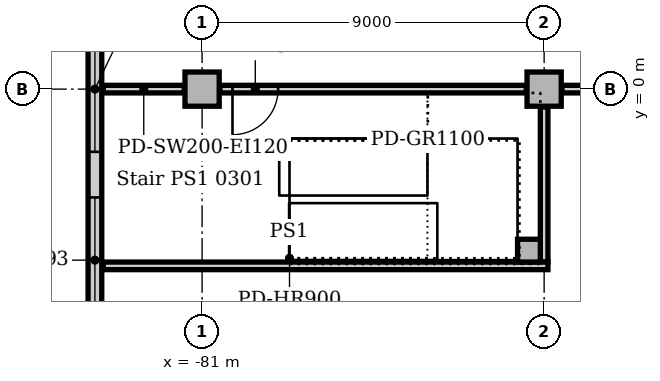
"""IFC4 building model, lengths in metres.
Left out: names, types, materials, properties, quantities, classifications, styles, units other than length and angle.
Written with IfcOpenShell. Run it as: python <this file> out.ifc"""

import sys

from ifc_helpers import new_model, si_unit, direction, frame, frame_2d, origin, origin_2d, place, context, subcontext, project, spatial, rectangle, extrude, element, fill, save


model = new_model("IFC4")
c1 = context("Model", 3, precision=1e-05, world=origin(), true_north=direction((0.0, 1.0)))
c2 = subcontext(c1, "Body", "Model", "MODEL_VIEW")
j1 = project(units=[si_unit("LENGTHUNIT", "METRE"), si_unit("PLANEANGLEUNIT", "RADIAN")], contexts=[c1])
p1 = place(None, origin())
s1 = spatial("IfcSite", under=j1, at=p1, CompositionType="ELEMENT")
p2 = place(p1, origin())
s2 = spatial("IfcBuilding", under=s1, at=p2, CompositionType="ELEMENT")
p3 = place(p2, frame((0.0, 0.0, 16.0)))
s3 = spatial("IfcBuildingStorey", under=s2, at=p3, CompositionType="ELEMENT", Elevation=16.0)
for number, where, z_axis, x_axis in (
    (1, (-81.0, 0.0, 0.0), (0.0, 0.0, 1.0), (1.0, 0.0, 0.0)),
    (2, (-72.0, 0.0, 0.0), (0.0, 0.0, 1.0), (1.0, 0.0, 0.0)),
):
    element("IfcColumn", number, at=place(p3, frame(where, z_axis=z_axis, x_axis=x_axis)), inside=s3, PredefinedType="COLUMN", context=c2, shape_type="SweptSolid", body=[
        extrude(rectangle(XDim=0.9, YDim=0.9, at=origin_2d()), origin(), (0.0, 0.0, 1.0), 4.7),
    ])
p4 = place(p3, frame((-83.82, 54.0, 0.0), z_axis=(0.0, 0.0, 1.0), x_axis=(0.0, -1.0, 0.0)))
e3 = element("IfcWall", 3, at=p4, inside=s3, PredefinedType="STANDARD", context=c2, shape_type="SweptSolid", body=[
    extrude(rectangle(XDim=63.0, YDim=0.36, at=frame_2d((31.5, 0.0))), origin(), (0.0, 0.0, 1.0), 4.7),
])
p5 = place(p4, frame((2.85, 0.0, 0.9)))
e4 = element("IfcOpeningElement", 4, at=p5, cuts=e3, PredefinedType="OPENING", context=c2, shape_type="SweptSolid", body=[
    extrude(rectangle(XDim=3.3, YDim=2.4, at=frame_2d((1.65, 1.2))), frame((0.0, 0.19, 0.0), z_axis=(0.0, -1.0, 0.0), x_axis=(1.0, 0.0, 0.0)), (0.0, 0.0, 1.0), 0.38),
])
p6 = place(p4, frame((7.35, 0.0, 0.9)))
e5 = element("IfcOpeningElement", 5, at=p6, cuts=e3, PredefinedType="OPENING", context=c2, shape_type="SweptSolid", body=[
    extrude(rectangle(XDim=3.3, YDim=2.4, at=frame_2d((1.65, 1.2))), frame((0.0, 0.19, 0.0), z_axis=(0.0, -1.0, 0.0), x_axis=(1.0, 0.0, 0.0)), (0.0, 0.0, 1.0), 0.38),
])
p7 = place(p4, frame((11.85, 0.0, 0.9)))
e6 = element("IfcOpeningElement", 6, at=p7, cuts=e3, PredefinedType="OPENING", context=c2, shape_type="SweptSolid", body=[
    extrude(rectangle(XDim=3.3, YDim=2.4, at=frame_2d((1.65, 1.2))), frame((0.0, 0.19, 0.0), z_axis=(0.0, -1.0, 0.0), x_axis=(1.0, 0.0, 0.0)), (0.0, 0.0, 1.0), 0.38),
])
p8 = place(p4, frame((16.35, 0.0, 0.9)))
e7 = element("IfcOpeningElement", 7, at=p8, cuts=e3, PredefinedType="OPENING", context=c2, shape_type="SweptSolid", body=[
    extrude(rectangle(XDim=3.3, YDim=2.4, at=frame_2d((1.65, 1.2))), frame((0.0, 0.19, 0.0), z_axis=(0.0, -1.0, 0.0), x_axis=(1.0, 0.0, 0.0)), (0.0, 0.0, 1.0), 0.38),
])
p9 = place(p4, frame((20.85, 0.0, 0.9)))
e8 = element("IfcOpeningElement", 8, at=p9, cuts=e3, PredefinedType="OPENING", context=c2, shape_type="SweptSolid", body=[
    extrude(rectangle(XDim=3.3, YDim=2.4, at=frame_2d((1.65, 1.2))), frame((0.0, 0.19, 0.0), z_axis=(0.0, -1.0, 0.0), x_axis=(1.0, 0.0, 0.0)), (0.0, 0.0, 1.0), 0.38),
])
p10 = place(p4, frame((25.35, 0.0, 0.9)))
e9 = element("IfcOpeningElement", 9, at=p10, cuts=e3, PredefinedType="OPENING", context=c2, shape_type="SweptSolid", body=[
    extrude(rectangle(XDim=3.3, YDim=2.4, at=frame_2d((1.65, 1.2))), frame((0.0, 0.19, 0.0), z_axis=(0.0, -1.0, 0.0), x_axis=(1.0, 0.0, 0.0)), (0.0, 0.0, 1.0), 0.38),
])
p11 = place(p4, frame((29.85, 0.0, 0.9)))
e10 = element("IfcOpeningElement", 10, at=p11, cuts=e3, PredefinedType="OPENING", context=c2, shape_type="SweptSolid", body=[
    extrude(rectangle(XDim=3.3, YDim=2.4, at=frame_2d((1.65, 1.2))), frame((0.0, 0.19, 0.0), z_axis=(0.0, -1.0, 0.0), x_axis=(1.0, 0.0, 0.0)), (0.0, 0.0, 1.0), 0.38),
])
p12 = place(p4, frame((34.35, 0.0, 0.9)))
e11 = element("IfcOpeningElement", 11, at=p12, cuts=e3, PredefinedType="OPENING", context=c2, shape_type="SweptSolid", body=[
    extrude(rectangle(XDim=3.3, YDim=2.4, at=frame_2d((1.65, 1.2))), frame((0.0, 0.19, 0.0), z_axis=(0.0, -1.0, 0.0), x_axis=(1.0, 0.0, 0.0)), (0.0, 0.0, 1.0), 0.38),
])
p13 = place(p4, frame((38.85, 0.0, 0.9)))
e12 = element("IfcOpeningElement", 12, at=p13, cuts=e3, PredefinedType="OPENING", context=c2, shape_type="SweptSolid", body=[
    extrude(rectangle(XDim=3.3, YDim=2.4, at=frame_2d((1.65, 1.2))), frame((0.0, 0.19, 0.0), z_axis=(0.0, -1.0, 0.0), x_axis=(1.0, 0.0, 0.0)), (0.0, 0.0, 1.0), 0.38),
])
p14 = place(p4, frame((43.35, 0.0, 0.9)))
e13 = element("IfcOpeningElement", 13, at=p14, cuts=e3, PredefinedType="OPENING", context=c2, shape_type="SweptSolid", body=[
    extrude(rectangle(XDim=3.3, YDim=2.4, at=frame_2d((1.65, 1.2))), frame((0.0, 0.19, 0.0), z_axis=(0.0, -1.0, 0.0), x_axis=(1.0, 0.0, 0.0)), (0.0, 0.0, 1.0), 0.38),
])
p15 = place(p4, frame((47.85, 0.0, 0.9)))
e14 = element("IfcOpeningElement", 14, at=p15, cuts=e3, PredefinedType="OPENING", context=c2, shape_type="SweptSolid", body=[
    extrude(rectangle(XDim=3.3, YDim=2.4, at=frame_2d((1.65, 1.2))), frame((0.0, 0.19, 0.0), z_axis=(0.0, -1.0, 0.0), x_axis=(1.0, 0.0, 0.0)), (0.0, 0.0, 1.0), 0.38),
])
p16 = place(p4, frame((52.35, 0.0, 0.9)))
e15 = element("IfcOpeningElement", 15, at=p16, cuts=e3, PredefinedType="OPENING", context=c2, shape_type="SweptSolid", body=[
    extrude(rectangle(XDim=3.3, YDim=2.4, at=frame_2d((1.65, 1.2))), frame((0.0, 0.19, 0.0), z_axis=(0.0, -1.0, 0.0), x_axis=(1.0, 0.0, 0.0)), (0.0, 0.0, 1.0), 0.38),
])
p17 = place(p4, frame((56.85, 0.0, 0.9)))
e16 = element("IfcOpeningElement", 16, at=p17, cuts=e3, PredefinedType="OPENING", context=c2, shape_type="SweptSolid", body=[
    extrude(rectangle(XDim=3.3, YDim=2.4, at=frame_2d((1.65, 1.2))), frame((0.0, 0.19, 0.0), z_axis=(0.0, -1.0, 0.0), x_axis=(1.0, 0.0, 0.0)), (0.0, 0.0, 1.0), 0.38),
])
p18 = place(p3, frame((-72.4, -4.25, 0.0), z_axis=(0.0, 0.0, 1.0), x_axis=(1.0, 0.0, 0.0)))
e17 = element("IfcColumn", 17, at=p18, inside=s3, PredefinedType="COLUMN", context=c2, shape_type="SweptSolid", body=[
    extrude(rectangle(XDim=0.6, YDim=0.6, at=origin_2d()), origin(), (0.0, 0.0, 1.0), 5.0),
])
p19 = place(p3, frame((-83.6, 0.0, 0.0), z_axis=(0.0, 0.0, 1.0), x_axis=(1.0, 0.0, 0.0)))
e18 = element("IfcWall", 18, at=p19, inside=s3, PredefinedType="SOLIDWALL", context=c2, shape_type="SweptSolid", body=[
    extrude(rectangle(XDim=2.13, YDim=0.2, at=frame_2d((1.065, 0.0))), origin(), (0.0, 0.0, 1.0), 4.7),
])
p20 = place(p3, frame((-80.53, 0.0, 0.0), z_axis=(0.0, 0.0, 1.0), x_axis=(1.0, 0.0, 0.0)))
e19 = element("IfcWall", 19, at=p20, inside=s3, PredefinedType="SOLIDWALL", context=c2, shape_type="SweptSolid", body=[
    extrude(rectangle(XDim=8.06, YDim=0.2, at=frame_2d((4.03, 0.0))), origin(), (0.0, 0.0, 1.0), 4.7),
])
p21 = place(p20, frame((0.33, 0.0, 0.0)))
e20 = element("IfcOpeningElement", 20, at=p21, cuts=e19, PredefinedType="OPENING", context=c2, shape_type="SweptSolid", body=[
    extrude(rectangle(XDim=1.2, YDim=2.1, at=frame_2d((0.6, 1.05))), frame((0.0, 0.11, 0.0), z_axis=(0.0, -1.0, 0.0), x_axis=(1.0, 0.0, 0.0)), (0.0, 0.0, 1.0), 0.22),
])
p22 = place(p3, frame((-72.0, -4.55, 0.0), z_axis=(0.0, 0.0, 1.0), x_axis=(0.0, 1.0, 0.0)))
e21 = element("IfcWall", 21, at=p22, inside=s3, PredefinedType="SOLIDWALL", context=c2, shape_type="SweptSolid", body=[
    extrude(rectangle(XDim=4.08, YDim=0.2, at=frame_2d((2.04, 0.0))), origin(), (0.0, 0.0, 1.0), 4.7),
])
p23 = place(p3, frame((-83.6, -4.65, 0.0), z_axis=(0.0, 0.0, 1.0), x_axis=(1.0, 0.0, 0.0)))
e22 = element("IfcWall", 22, at=p23, inside=s3, PredefinedType="SOLIDWALL", context=c2, shape_type="SweptSolid", body=[
    extrude(rectangle(XDim=11.7, YDim=0.2, at=frame_2d((5.85, 0.0))), origin(), (0.0, 0.0, 1.0), 4.7),
])
p24 = place(p3, frame((-71.53, 0.0, 0.0), z_axis=(0.0, 0.0, 1.0), x_axis=(1.0, 0.0, 0.0)))
e23 = element("IfcWall", 23, at=p24, inside=s3, PredefinedType="PARTITIONING", context=c2, shape_type="SweptSolid", body=[
    extrude(rectangle(XDim=8.53, YDim=0.2, at=frame_2d((4.265, 0.0))), origin(), (0.0, 0.0, 1.0), 4.7),
])
p25 = place(p24, frame((3.53, 0.0, 0.0)))
e24 = element("IfcOpeningElement", 24, at=p25, cuts=e23, PredefinedType="OPENING", context=c2, shape_type="SweptSolid", body=[
    extrude(rectangle(XDim=1.0, YDim=2.1, at=frame_2d((0.5, 1.05))), frame((0.0, 0.11, 0.0), z_axis=(0.0, -1.0, 0.0), x_axis=(1.0, 0.0, 0.0)), (0.0, 0.0, 1.0), 0.22),
])
p26 = place(p16, origin())
e25 = element("IfcWindow", 25, at=p26, inside=s3, PartitioningType="SINGLE_PANEL", PredefinedType="WINDOW", context=c2, shape_type="SweptSolid", body=[
    extrude(rectangle(XDim=3.3, YDim=2.4, at=frame_2d((1.65, 1.2))), frame((0.0, 0.13, 0.0), z_axis=(0.0, -1.0, 0.0), x_axis=(1.0, 0.0, 0.0)), (0.0, 0.0, 1.0), 0.06),
])
fill(e15, e25)
p27 = place(p17, origin())
e26 = element("IfcWindow", 26, at=p27, inside=s3, PartitioningType="SINGLE_PANEL", PredefinedType="WINDOW", context=c2, shape_type="SweptSolid", body=[
    extrude(rectangle(XDim=3.3, YDim=2.4, at=frame_2d((1.65, 1.2))), frame((0.0, 0.13, 0.0), z_axis=(0.0, -1.0, 0.0), x_axis=(1.0, 0.0, 0.0)), (0.0, 0.0, 1.0), 0.06),
])
fill(e16, e26)
p28 = place(p21, frame((1.2, 0.0, 0.0), z_axis=(0.0, 0.0, 1.0), x_axis=(-1.0, 0.0, 0.0)))
e27 = element("IfcDoor", 27, at=p28, inside=s3, OperationType="SINGLE_SWING_RIGHT", PredefinedType="DOOR", context=c2, shape_type="SweptSolid", body=[
    extrude(rectangle(XDim=1.2, YDim=2.1, at=frame_2d((0.6, 1.05))), frame((0.0, 0.025, 0.0), z_axis=(0.0, -1.0, 0.0), x_axis=(1.0, 0.0, 0.0)), (0.0, 0.0, 1.0), 0.05),
])
fill(e20, e27)
save(model, sys.argv[1])
